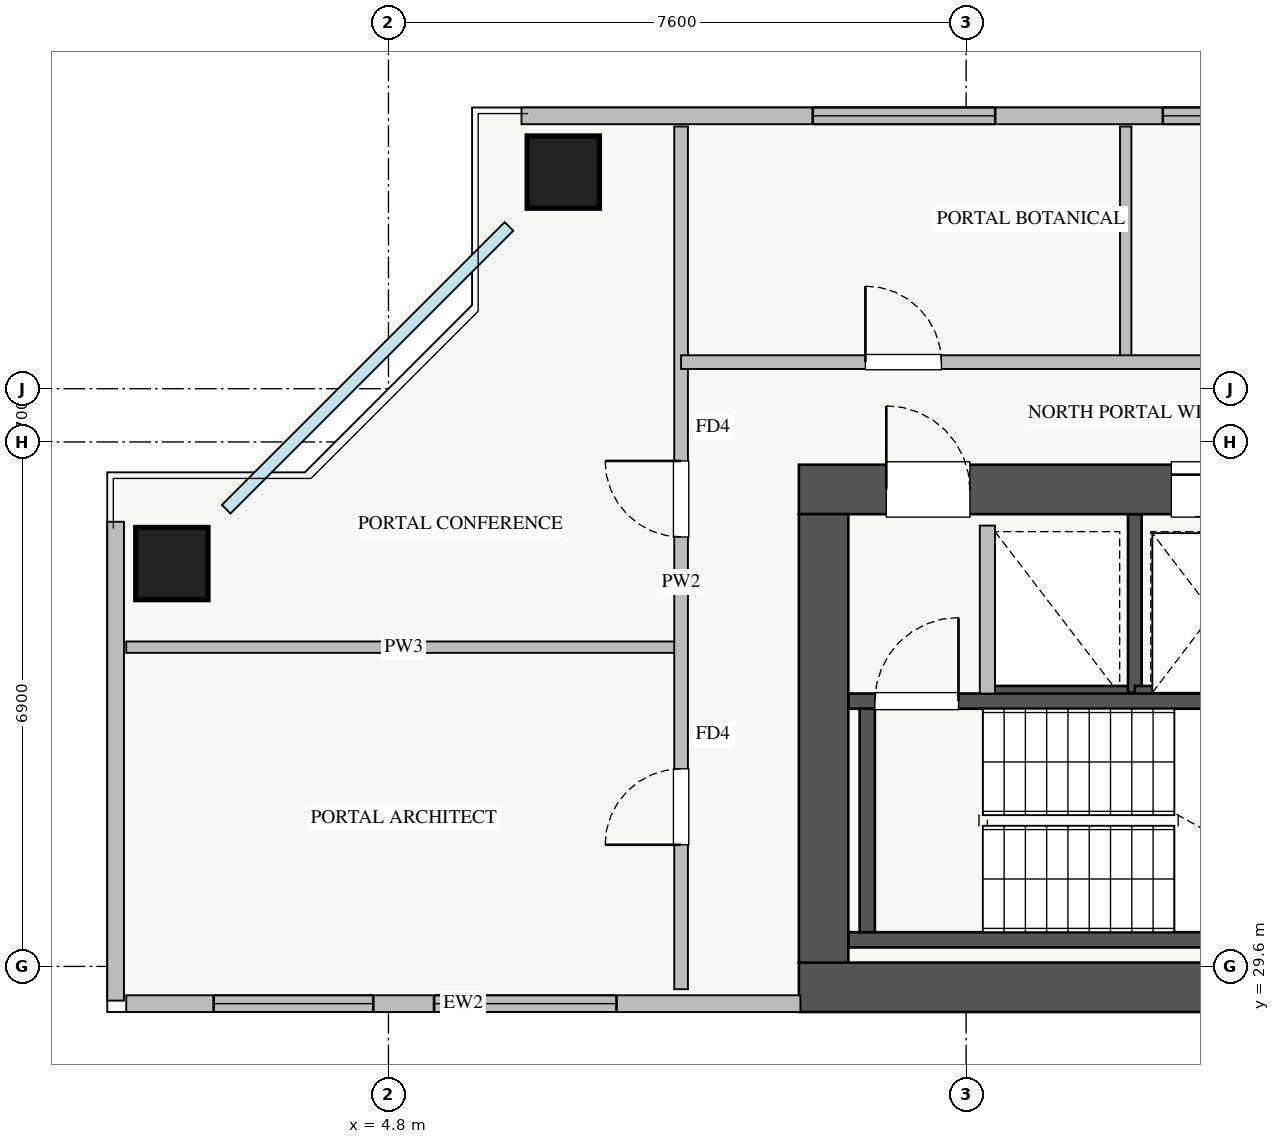
"""IFC4 building model, lengths in metres.
Left out: names, types, materials, properties, quantities, classifications, styles, units other than length and angle.
Written with IfcOpenShell. Run it as: python <this file> out.ifc"""

import sys

from ifc_helpers import new_model, si_unit, direction, frame, frame_2d, origin, origin_2d, place, context, subcontext, project, spatial, rectangle, extrude, source, transform, mapped, element, fill, save


model = new_model("IFC4")
c1 = context("Model", 3, precision=1e-05, world=origin(), true_north=direction((0.0, 1.0)))
c2 = subcontext(c1, "Body", "Model", "MODEL_VIEW")
j1 = project(units=[si_unit("LENGTHUNIT", "METRE"), si_unit("PLANEANGLEUNIT", "RADIAN")], contexts=[c1])
p1 = place(None, origin())
s1 = spatial("IfcSite", under=j1, at=p1, CompositionType="ELEMENT")
p2 = place(p1, origin())
s2 = spatial("IfcBuilding", under=s1, at=p2, CompositionType="ELEMENT")
p3 = place(p2, frame((0.0, 0.0, 163.25)))
s3 = spatial("IfcBuildingStorey", under=s2, at=p3, CompositionType="ELEMENT", Elevation=163.25)
p4 = place(p3, frame((12.68, 33.2, 0.0), z_axis=(0.0, 0.0, 1.0), x_axis=(1.0, 0.0, 0.0)))
e1 = element("IfcWall", 1, at=p4, inside=s3, PredefinedType="SHEAR", context=c2, shape_type="SweptSolid", body=[
    extrude(rectangle(XDim=1.94, YDim=0.18, at=frame_2d((0.97, 0.0))), origin(), (0.0, 0.0, 1.0), 3.07),
])
p5 = place(p3, frame((14.62, 33.2, 0.0), z_axis=(0.0, 0.0, 1.0), x_axis=(0.0, 1.0, 0.0)))
e2 = element("IfcWall", 2, at=p5, inside=s3, PredefinedType="SHEAR", context=c2, shape_type="SweptSolid", body=[
    extrude(rectangle(XDim=2.35, YDim=0.18, at=frame_2d((1.175, 0.0))), origin(), (0.0, 0.0, 1.0), 3.07),
])
p6 = place(p3, frame((14.62, 33.2, 0.0), z_axis=(0.0, 0.0, 1.0), x_axis=(1.0, 0.0, 0.0)))
e3 = element("IfcWall", 3, at=p6, inside=s3, PredefinedType="SHEAR", context=c2, shape_type="SweptSolid", body=[
    extrude(rectangle(XDim=1.96, YDim=0.18, at=frame_2d((0.98, 0.0))), origin(), (0.0, 0.0, 1.0), 3.07),
])
p7 = place(p3, frame((10.85, 29.95, 0.0), z_axis=(0.0, 0.0, 1.0), x_axis=(1.0, 0.0, 0.0)))
e4 = element("IfcWall", 4, at=p7, inside=s3, PredefinedType="SHEAR", context=c2, shape_type="SweptSolid", body=[
    extrude(rectangle(XDim=7.3, YDim=0.2, at=frame_2d((3.65, 0.0))), origin(), (0.0, 0.0, 1.0), 3.25),
])
p8 = place(p3, frame((10.85, 33.09, 0.0), z_axis=(0.0, 0.0, 1.0), x_axis=(1.0, 0.0, 0.0)))
e5 = element("IfcWall", 5, at=p8, inside=s3, PredefinedType="SHEAR", context=c2, shape_type="SweptSolid", body=[
    extrude(rectangle(XDim=7.3, YDim=0.2, at=frame_2d((3.65, 0.0))), origin(), (0.0, 0.0, 1.0), 3.25),
])
p9 = place(p8, frame((0.35, 0.0, 0.0)))
e6 = element("IfcOpeningElement", 6, at=p9, cuts=e5, PredefinedType="OPENING", context=c2, shape_type="SweptSolid", body=[
    extrude(rectangle(XDim=1.1, YDim=2.05, at=frame_2d((0.55, 1.025))), frame((0.0, 0.11, 0.0), z_axis=(0.0, -1.0, 0.0), x_axis=(1.0, 0.0, 0.0)), (0.0, 0.0, 1.0), 0.22),
])
p10 = place(p3, frame((11.1, 30.05, 0.0), z_axis=(0.0, 0.0, 1.0), x_axis=(0.0, 1.0, 0.0)))
e7 = element("IfcWall", 7, at=p10, inside=s3, PredefinedType="SHEAR", context=c2, shape_type="SweptSolid", body=[
    extrude(rectangle(XDim=2.94, YDim=0.2, at=frame_2d((1.47, 0.0))), origin(), (0.0, 0.0, 1.0), 3.25),
])
p11 = place(p3, frame((10.2, 29.325, 0.0), z_axis=(0.0, 0.0, 1.0), x_axis=(1.0, 0.0, 0.0)))
e8 = element("IfcWall", 8, at=p11, inside=s3, PredefinedType="SHEAR", context=c2, shape_type="SweptSolid", body=[
    extrude(rectangle(XDim=17.6, YDim=0.65, at=frame_2d((8.8, 0.0))), origin(), (0.0, 0.0, 1.0), 3.25),
])
p12 = place(p3, frame((10.2, 35.875, 0.0), z_axis=(0.0, 0.0, 1.0), x_axis=(1.0, 0.0, 0.0)))
e9 = element("IfcWall", 9, at=p12, inside=s3, PredefinedType="SHEAR", context=c2, shape_type="SweptSolid", body=[
    extrude(rectangle(XDim=17.6, YDim=0.65, at=frame_2d((8.8, 0.0))), origin(), (0.0, 0.0, 1.0), 3.25),
])
p13 = place(p12, frame((1.15, 0.0, 0.0)))
e10 = element("IfcOpeningElement", 10, at=p13, cuts=e9, PredefinedType="OPENING", context=c2, shape_type="SweptSolid", body=[
    extrude(rectangle(XDim=1.1, YDim=2.05, at=frame_2d((0.55, 1.025))), frame((0.0, 0.335, 0.0), z_axis=(0.0, -1.0, 0.0), x_axis=(1.0, 0.0, 0.0)), (0.0, 0.0, 1.0), 0.67),
])
p14 = place(p12, frame((8.3, 0.0, 0.0)))
e11 = element("IfcOpeningElement", 11, at=p14, cuts=e9, PredefinedType="OPENING", context=c2, shape_type="SweptSolid", body=[
    extrude(rectangle(XDim=1.1, YDim=2.05, at=frame_2d((0.55, 1.025))), frame((0.0, 0.335, 0.0), z_axis=(0.0, -1.0, 0.0), x_axis=(1.0, 0.0, 0.0)), (0.0, 0.0, 1.0), 0.67),
])
p15 = place(p12, frame((4.9, 0.0, 0.0)))
e12 = element("IfcOpeningElement", 12, at=p15, cuts=e9, PredefinedType="OPENING", context=c2, shape_type="SweptSolid", body=[
    extrude(rectangle(XDim=1.1, YDim=2.05, at=frame_2d((0.55, 1.025))), frame((0.0, 0.335, 0.0), z_axis=(0.0, -1.0, 0.0), x_axis=(1.0, 0.0, 0.0)), (0.0, 0.0, 1.0), 0.67),
])
p16 = place(p12, frame((14.74, 0.0, 0.0)))
e13 = element("IfcOpeningElement", 13, at=p16, cuts=e9, PredefinedType="OPENING", context=c2, shape_type="SweptSolid", body=[
    extrude(rectangle(XDim=1.0, YDim=2.05, at=frame_2d((0.5, 1.025))), frame((0.0, 0.335, 0.0), z_axis=(0.0, -1.0, 0.0), x_axis=(1.0, 0.0, 0.0)), (0.0, 0.0, 1.0), 0.67),
])
p17 = place(p12, frame((10.005, 0.0, 0.0)))
e14 = element("IfcOpeningElement", 14, at=p17, cuts=e9, PredefinedType="OPENING", context=c2, shape_type="SweptSolid", body=[
    extrude(rectangle(XDim=1.0, YDim=2.05, at=frame_2d((0.5, 1.025))), frame((0.0, 0.335, 0.0), z_axis=(0.0, -1.0, 0.0), x_axis=(1.0, 0.0, 0.0)), (0.0, 0.0, 1.0), 0.67),
])
p18 = place(p12, frame((11.55, 0.0, 0.0)))
e15 = element("IfcOpeningElement", 15, at=p18, cuts=e9, PredefinedType="OPENING", context=c2, shape_type="SweptSolid", body=[
    extrude(rectangle(XDim=1.0, YDim=2.05, at=frame_2d((0.5, 1.025))), frame((0.0, 0.335, 0.0), z_axis=(0.0, -1.0, 0.0), x_axis=(1.0, 0.0, 0.0)), (0.0, 0.0, 1.0), 0.67),
])
p19 = place(p12, frame((13.215, 0.0, 0.0)))
e16 = element("IfcOpeningElement", 16, at=p19, cuts=e9, PredefinedType="OPENING", context=c2, shape_type="SweptSolid", body=[
    extrude(rectangle(XDim=1.0, YDim=2.05, at=frame_2d((0.5, 1.025))), frame((0.0, 0.335, 0.0), z_axis=(0.0, -1.0, 0.0), x_axis=(1.0, 0.0, 0.0)), (0.0, 0.0, 1.0), 0.67),
])
p20 = place(p3, frame((10.525, 29.65, 0.0), z_axis=(0.0, 0.0, 1.0), x_axis=(0.0, 1.0, 0.0)))
e17 = element("IfcWall", 17, at=p20, inside=s3, PredefinedType="SHEAR", context=c2, shape_type="SweptSolid", body=[
    extrude(rectangle(XDim=5.9, YDim=0.65, at=frame_2d((2.95, 0.0))), origin(), (0.0, 0.0, 1.0), 3.25),
])
m1 = source(origin(), c2, "Body", "SweptSolid", [
    extrude(rectangle(XDim=0.95, YDim=0.95, at=origin_2d()), origin(), (0.0, 0.0, 1.0), 3.25),
])
for number, where, z_axis, x_axis in (
    (18, (7.1, 40.05, 0.0), (0.0, 0.0, 1.0), (1.0, 0.0, 0.0)),
    (19, (1.95, 34.9, 0.0), (0.0, 0.0, 1.0), (1.0, 0.0, 0.0)),
):
    element("IfcColumn", number, at=place(p3, frame(where, z_axis=z_axis, x_axis=x_axis)), inside=s3, PredefinedType="COLUMN", context=c2, shape_type="MappedRepresentation", body=[
        mapped(m1, transform((0.0, 0.0, 0.0), x_axis=(1.0, 0.0, 0.0), y_axis=(0.0, 1.0, 0.0), z_axis=(0.0, 0.0, 1.0), scale=1.0)),
    ])
p21 = place(p3, frame((1.35, 29.11, 0.0), z_axis=(0.0, 0.0, 1.0), x_axis=(1.0, 0.0, 0.0)))
e20 = element("IfcWall", 20, at=p21, inside=s3, PredefinedType="STANDARD", context=c2, shape_type="SweptSolid", body=[
    extrude(rectangle(XDim=8.87, YDim=0.22, at=frame_2d((4.435, 0.0))), origin(), (0.0, 0.0, 1.0), 2.61),
])
p22 = place(p21, frame((1.15, 0.0, 0.9)))
e21 = element("IfcOpeningElement", 21, at=p22, cuts=e20, PredefinedType="OPENING", context=c2, shape_type="SweptSolid", body=[
    extrude(rectangle(XDim=2.1, YDim=1.48, at=frame_2d((1.05, 0.74))), frame((0.0, 0.12, 0.0), z_axis=(0.0, -1.0, 0.0), x_axis=(1.0, 0.0, 0.0)), (0.0, 0.0, 1.0), 0.24),
])
p23 = place(p21, frame((4.05, 0.0, 0.9)))
e22 = element("IfcOpeningElement", 22, at=p23, cuts=e20, PredefinedType="OPENING", context=c2, shape_type="SweptSolid", body=[
    extrude(rectangle(XDim=2.4, YDim=1.5, at=frame_2d((1.2, 0.75))), frame((0.0, 0.12, 0.0), z_axis=(0.0, -1.0, 0.0), x_axis=(1.0, 0.0, 0.0)), (0.0, 0.0, 1.0), 0.24),
])
p24 = place(p3, frame((1.21, 29.15, 0.0), z_axis=(0.0, 0.0, 1.0), x_axis=(0.0, 1.0, 0.0)))
e23 = element("IfcWall", 23, at=p24, inside=s3, PredefinedType="STANDARD", context=c2, shape_type="SweptSolid", body=[
    extrude(rectangle(XDim=6.3, YDim=0.22, at=frame_2d((3.15, 0.0))), origin(), (0.0, 0.0, 1.0), 2.61),
])
p25 = place(p3, frame((6.55, 40.79, 0.0), z_axis=(0.0, 0.0, 1.0), x_axis=(1.0, 0.0, 0.0)))
e24 = element("IfcWall", 24, at=p25, inside=s3, PredefinedType="STANDARD", context=c2, shape_type="SweptSolid", body=[
    extrude(rectangle(XDim=24.9, YDim=0.22, at=frame_2d((12.45, 0.0))), origin(), (0.0, 0.0, 1.0), 2.61),
])
p26 = place(p25, frame((3.833, 0.0, 0.9)))
e25 = element("IfcOpeningElement", 25, at=p26, cuts=e24, PredefinedType="OPENING", context=c2, shape_type="SweptSolid", body=[
    extrude(rectangle(XDim=2.4, YDim=1.5, at=frame_2d((1.2, 0.75))), frame((0.0, 0.12, 0.0), z_axis=(0.0, -1.0, 0.0), x_axis=(1.0, 0.0, 0.0)), (0.0, 0.0, 1.0), 0.24),
])
p27 = place(p25, frame((8.438, 0.0, 0.9)))
e26 = element("IfcOpeningElement", 26, at=p27, cuts=e24, PredefinedType="OPENING", context=c2, shape_type="SweptSolid", body=[
    extrude(rectangle(XDim=1.8, YDim=1.45, at=frame_2d((0.9, 0.725))), frame((0.0, 0.12, 0.0), z_axis=(0.0, -1.0, 0.0), x_axis=(1.0, 0.0, 0.0)), (0.0, 0.0, 1.0), 0.24),
])
p28 = place(p25, frame((14.813, 0.0, 0.9)))
e27 = element("IfcOpeningElement", 27, at=p28, cuts=e24, PredefinedType="OPENING", context=c2, shape_type="SweptSolid", body=[
    extrude(rectangle(XDim=1.5, YDim=1.45, at=frame_2d((0.75, 0.725))), frame((0.0, 0.12, 0.0), z_axis=(0.0, -1.0, 0.0), x_axis=(1.0, 0.0, 0.0)), (0.0, 0.0, 1.0), 0.24),
])
p29 = place(p25, frame((20.738, 0.0, 0.9)))
e28 = element("IfcOpeningElement", 28, at=p29, cuts=e24, PredefinedType="OPENING", context=c2, shape_type="SweptSolid", body=[
    extrude(rectangle(XDim=2.1, YDim=1.48, at=frame_2d((1.05, 0.74))), frame((0.0, 0.12, 0.0), z_axis=(0.0, -1.0, 0.0), x_axis=(1.0, 0.0, 0.0)), (0.0, 0.0, 1.0), 0.24),
])
p30 = place(p3, frame((12.68, 33.19, 0.0), z_axis=(0.0, 0.0, 1.0), x_axis=(0.0, 1.0, 0.0)))
e29 = element("IfcWall", 29, at=p30, inside=s3, PredefinedType="PARTITIONING", context=c2, shape_type="SweptSolid", body=[
    extrude(rectangle(XDim=2.21, YDim=0.2, at=frame_2d((1.105, 0.0))), origin(), (0.0, 0.0, 1.0), 3.07),
])
p31 = place(p3, frame((1.35, 33.8, 0.0), z_axis=(0.0, 0.0, 1.0), x_axis=(1.0, 0.0, 0.0)))
e30 = element("IfcWall", 30, at=p31, inside=s3, PredefinedType="PARTITIONING", context=c2, shape_type="SweptSolid", body=[
    extrude(rectangle(XDim=7.3, YDim=0.15, at=frame_2d((3.65, 0.0))), origin(), (0.0, 0.0, 1.0), 3.07),
])
p32 = place(p3, frame((8.65, 29.3, 0.0), z_axis=(0.0, 0.0, 1.0), x_axis=(0.0, 1.0, 0.0)))
e31 = element("IfcWall", 31, at=p32, inside=s3, PredefinedType="PARTITIONING", context=c2, shape_type="SweptSolid", body=[
    extrude(rectangle(XDim=11.35, YDim=0.18, at=frame_2d((5.675, 0.0))), origin(), (0.0, 0.0, 1.0), 3.07),
])
p33 = place(p32, frame((1.9, 0.0, 0.0)))
e32 = element("IfcOpeningElement", 32, at=p33, cuts=e31, PredefinedType="OPENING", context=c2, shape_type="SweptSolid", body=[
    extrude(rectangle(XDim=1.0, YDim=2.05, at=frame_2d((0.5, 1.025))), frame((0.0, 0.1, 0.0), z_axis=(0.0, -1.0, 0.0), x_axis=(1.0, 0.0, 0.0)), (0.0, 0.0, 1.0), 0.2),
])
p34 = place(p32, frame((5.95, 0.0, 0.0)))
e33 = element("IfcOpeningElement", 33, at=p34, cuts=e31, PredefinedType="OPENING", context=c2, shape_type="SweptSolid", body=[
    extrude(rectangle(XDim=1.0, YDim=2.05, at=frame_2d((0.5, 1.025))), frame((0.0, 0.1, 0.0), z_axis=(0.0, -1.0, 0.0), x_axis=(1.0, 0.0, 0.0)), (0.0, 0.0, 1.0), 0.2),
])
p35 = place(p3, frame((14.5, 37.55, 0.0), z_axis=(0.0, 0.0, 1.0), x_axis=(0.0, 1.0, 0.0)))
e34 = element("IfcWall", 34, at=p35, inside=s3, PredefinedType="PARTITIONING", context=c2, shape_type="SweptSolid", body=[
    extrude(rectangle(XDim=3.1, YDim=0.15, at=frame_2d((1.55, 0.0))), origin(), (0.0, 0.0, 1.0), 3.07),
])
p36 = place(p3, frame((8.65, 37.55, 0.0), z_axis=(0.0, 0.0, 1.0), x_axis=(1.0, 0.0, 0.0)))
e35 = element("IfcWall", 35, at=p36, inside=s3, PredefinedType="PARTITIONING", context=c2, shape_type="SweptSolid", body=[
    extrude(rectangle(XDim=23.8, YDim=0.18, at=frame_2d((11.9, 0.0))), origin(), (0.0, 0.0, 1.0), 3.07),
])
p37 = place(p36, frame((2.425, 0.0, 0.0)))
e36 = element("IfcOpeningElement", 36, at=p37, cuts=e35, PredefinedType="OPENING", context=c2, shape_type="SweptSolid", body=[
    extrude(rectangle(XDim=1.0, YDim=2.05, at=frame_2d((0.5, 1.025))), frame((0.0, 0.1, 0.0), z_axis=(0.0, -1.0, 0.0), x_axis=(1.0, 0.0, 0.0)), (0.0, 0.0, 1.0), 0.2),
])
p38 = place(p36, frame((8.35, 0.0, 0.0)))
e37 = element("IfcOpeningElement", 37, at=p38, cuts=e35, PredefinedType="OPENING", context=c2, shape_type="SweptSolid", body=[
    extrude(rectangle(XDim=1.0, YDim=2.05, at=frame_2d((0.5, 1.025))), frame((0.0, 0.1, 0.0), z_axis=(0.0, -1.0, 0.0), x_axis=(1.0, 0.0, 0.0)), (0.0, 0.0, 1.0), 0.2),
])
p39 = place(p36, frame((14.35, 0.0, 0.0)))
e38 = element("IfcOpeningElement", 38, at=p39, cuts=e35, PredefinedType="OPENING", context=c2, shape_type="SweptSolid", body=[
    extrude(rectangle(XDim=1.0, YDim=2.05, at=frame_2d((0.5, 1.025))), frame((0.0, 0.1, 0.0), z_axis=(0.0, -1.0, 0.0), x_axis=(1.0, 0.0, 0.0)), (0.0, 0.0, 1.0), 0.2),
])
p40 = place(p36, frame((20.325, 0.0, 0.0)))
e39 = element("IfcOpeningElement", 39, at=p40, cuts=e35, PredefinedType="OPENING", context=c2, shape_type="SweptSolid", body=[
    extrude(rectangle(XDim=1.0, YDim=2.05, at=frame_2d((0.5, 1.025))), frame((0.0, 0.1, 0.0), z_axis=(0.0, -1.0, 0.0), x_axis=(1.0, 0.0, 0.0)), (0.0, 0.0, 1.0), 0.2),
])
m2 = source(origin(), c2, "Body", "SweptSolid", [
    extrude(rectangle(XDim=2.1, YDim=1.48, at=frame_2d((1.05, 0.74))), frame((0.0, 0.03, 0.0), z_axis=(0.0, -1.0, 0.0), x_axis=(1.0, 0.0, 0.0)), (0.0, 0.0, 1.0), 0.06),
])
p41 = place(p22, origin())
e40 = element("IfcWindow", 40, at=p41, inside=s3, PartitioningType="TRIPLE_PANEL_VERTICAL", PredefinedType="WINDOW", context=c2, shape_type="MappedRepresentation", body=[
    mapped(m2, transform((0.0, 0.0, 0.0), x_axis=(1.0, 0.0, 0.0), y_axis=(0.0, 1.0, 0.0), z_axis=(0.0, 0.0, 1.0), scale=1.0)),
])
fill(e21, e40)
m3 = source(origin(), c2, "Body", "SweptSolid", [
    extrude(rectangle(XDim=2.4, YDim=1.5, at=frame_2d((1.2, 0.75))), frame((0.0, 0.03, 0.0), z_axis=(0.0, -1.0, 0.0), x_axis=(1.0, 0.0, 0.0)), (0.0, 0.0, 1.0), 0.06),
])
p42 = place(p23, origin())
e41 = element("IfcWindow", 41, at=p42, inside=s3, PartitioningType="TRIPLE_PANEL_VERTICAL", PredefinedType="WINDOW", context=c2, shape_type="MappedRepresentation", body=[
    mapped(m3, transform((0.0, 0.0, 0.0), x_axis=(1.0, 0.0, 0.0), y_axis=(0.0, 1.0, 0.0), z_axis=(0.0, 0.0, 1.0), scale=1.0)),
])
fill(e22, e41)
p43 = place(p26, origin())
e42 = element("IfcWindow", 42, at=p43, inside=s3, PartitioningType="TRIPLE_PANEL_VERTICAL", PredefinedType="WINDOW", context=c2, shape_type="MappedRepresentation", body=[
    mapped(m3, transform((0.0, 0.0, 0.0), x_axis=(1.0, 0.0, 0.0), y_axis=(0.0, 1.0, 0.0), z_axis=(0.0, 0.0, 1.0), scale=1.0)),
])
fill(e25, e42)
m4 = source(origin(), c2, "Body", "SweptSolid", [
    extrude(rectangle(XDim=1.8, YDim=1.45, at=frame_2d((0.9, 0.725))), frame((0.0, 0.03, 0.0), z_axis=(0.0, -1.0, 0.0), x_axis=(1.0, 0.0, 0.0)), (0.0, 0.0, 1.0), 0.06),
])
p44 = place(p27, origin())
e43 = element("IfcWindow", 43, at=p44, inside=s3, PartitioningType="DOUBLE_PANEL_VERTICAL", PredefinedType="WINDOW", context=c2, shape_type="MappedRepresentation", body=[
    mapped(m4, transform((0.0, 0.0, 0.0), x_axis=(1.0, 0.0, 0.0), y_axis=(0.0, 1.0, 0.0), z_axis=(0.0, 0.0, 1.0), scale=1.0)),
])
fill(e26, e43)
m5 = source(origin(), c2, "Body", "SweptSolid", [
    extrude(rectangle(XDim=1.1, YDim=2.05, at=frame_2d((0.55, 1.025))), frame((0.0, 0.025, 0.0), z_axis=(0.0, -1.0, 0.0), x_axis=(1.0, 0.0, 0.0)), (0.0, 0.0, 1.0), 0.05),
])
p45 = place(p13, origin())
e44 = element("IfcDoor", 44, at=p45, inside=s3, OperationType="SINGLE_SWING_LEFT", PredefinedType="DOOR", context=c2, shape_type="MappedRepresentation", body=[
    mapped(m5, transform((0.0, 0.0, 0.0), x_axis=(1.0, 0.0, 0.0), y_axis=(0.0, 1.0, 0.0), z_axis=(0.0, 0.0, 1.0), scale=1.0)),
])
fill(e10, e44)
p46 = place(p9, origin())
e45 = element("IfcDoor", 45, at=p46, inside=s3, OperationType="SINGLE_SWING_RIGHT", PredefinedType="DOOR", context=c2, shape_type="MappedRepresentation", body=[
    mapped(m5, transform((0.0, 0.0, 0.0), x_axis=(1.0, 0.0, 0.0), y_axis=(0.0, 1.0, 0.0), z_axis=(0.0, 0.0, 1.0), scale=1.0)),
])
fill(e6, e45)
p47 = place(p15, origin())
e46 = element("IfcDoor", 46, at=p47, inside=s3, OperationType="SLIDING_TO_LEFT", PredefinedType="DOOR", context=c2, shape_type="MappedRepresentation", body=[
    mapped(m5, transform((0.0, 0.0, 0.0), x_axis=(1.0, 0.0, 0.0), y_axis=(0.0, 1.0, 0.0), z_axis=(0.0, 0.0, 1.0), scale=1.0)),
])
fill(e12, e46)
m6 = source(origin(), c2, "Body", "SweptSolid", [
    extrude(rectangle(XDim=1.0, YDim=2.05, at=frame_2d((0.5, 1.025))), frame((0.0, 0.025, 0.0), z_axis=(0.0, -1.0, 0.0), x_axis=(1.0, 0.0, 0.0)), (0.0, 0.0, 1.0), 0.05),
])
p48 = place(p33, origin())
e47 = element("IfcDoor", 47, at=p48, inside=s3, OperationType="SINGLE_SWING_LEFT", PredefinedType="DOOR", context=c2, shape_type="MappedRepresentation", body=[
    mapped(m6, transform((0.0, 0.0, 0.0), x_axis=(1.0, 0.0, 0.0), y_axis=(0.0, 1.0, 0.0), z_axis=(0.0, 0.0, 1.0), scale=1.0)),
])
fill(e32, e47)
p49 = place(p34, origin())
e48 = element("IfcDoor", 48, at=p49, inside=s3, OperationType="SINGLE_SWING_RIGHT", PredefinedType="DOOR", context=c2, shape_type="MappedRepresentation", body=[
    mapped(m6, transform((0.0, 0.0, 0.0), x_axis=(1.0, 0.0, 0.0), y_axis=(0.0, 1.0, 0.0), z_axis=(0.0, 0.0, 1.0), scale=1.0)),
])
fill(e33, e48)
p50 = place(p37, origin())
e49 = element("IfcDoor", 49, at=p50, inside=s3, OperationType="SINGLE_SWING_LEFT", PredefinedType="DOOR", context=c2, shape_type="MappedRepresentation", body=[
    mapped(m6, transform((0.0, 0.0, 0.0), x_axis=(1.0, 0.0, 0.0), y_axis=(0.0, 1.0, 0.0), z_axis=(0.0, 0.0, 1.0), scale=1.0)),
])
fill(e36, e49)
save(model, sys.argv[1])
